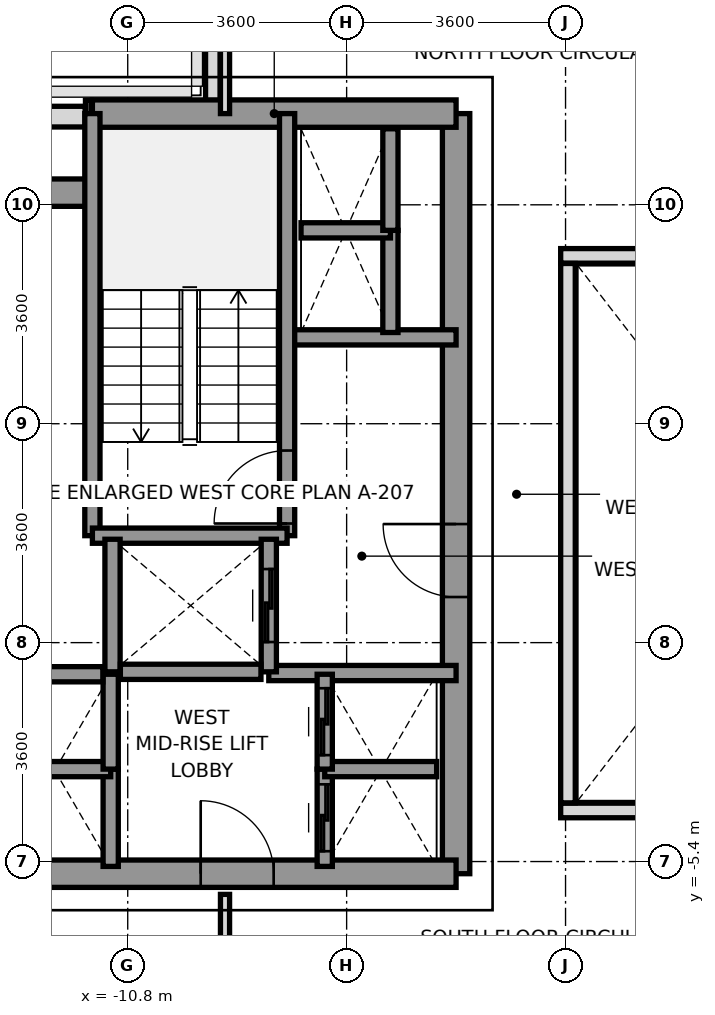
"""IFC4 building model, lengths in metres.
Left out: names, types, materials, properties, quantities, classifications, styles, units other than length and angle.
Written with IfcOpenShell. Run it as: python <this file> out.ifc"""

import sys

from ifc_helpers import new_model, si_unit, direction, frame, frame_2d, origin, place, context, subcontext, project, spatial, rectangle, extrude, source, transform, mapped, element, fill, save


model = new_model("IFC4")
c1 = context("Model", 3, precision=1e-05, world=origin(), true_north=direction((0.0, 1.0)))
c2 = subcontext(c1, "Body", "Model", "MODEL_VIEW")
j1 = project(units=[si_unit("LENGTHUNIT", "METRE"), si_unit("PLANEANGLEUNIT", "RADIAN")], contexts=[c1])
p1 = place(None, origin())
s1 = spatial("IfcSite", under=j1, at=p1, CompositionType="ELEMENT")
p2 = place(p1, origin())
s2 = spatial("IfcBuilding", under=s1, at=p2, CompositionType="ELEMENT")
p3 = place(p2, frame((0.0, 0.0, 97.2)))
s3 = spatial("IfcBuildingStorey", under=s2, at=p3, CompositionType="ELEMENT", Elevation=97.2)
p4 = place(p3, frame((-14.083, 6.85, 0.0), z_axis=(0.0, 0.0, 1.0), x_axis=(1.0, 0.0, 0.0)))
e1 = element("IfcWall", 1, at=p4, inside=s3, PredefinedType="SOLIDWALL", context=c2, shape_type="SweptSolid", body=[
    extrude(rectangle(XDim=2.585, YDim=0.34, at=frame_2d((1.292, 0.0))), origin(), (0.0, 0.0, 1.0), 3.2),
])
p5 = place(p3, frame((-11.495, 7.0, 0.0), z_axis=(0.0, 0.0, 1.0), x_axis=(1.0, 0.0, 0.0)))
e2 = element("IfcWall", 2, at=p5, inside=s3, PredefinedType="PARAPET", context=c2, shape_type="SweptSolid", body=[
    extrude(rectangle(XDim=0.092, YDim=0.24, at=frame_2d((0.046, 0.0))), origin(), (0.0, 0.0, 1.0), 1.15),
])
p6 = place(p3, frame((-9.4, 6.953, 0.0), z_axis=(0.0, 0.0, 1.0), x_axis=(0.0, 1.0, 0.0)))
e3 = element("IfcWall", 3, at=p6, inside=s3, PredefinedType="PARAPET", context=c2, shape_type="SweptSolid", body=[
    extrude(rectangle(XDim=1.519, YDim=0.24, at=frame_2d((0.76, 0.0))), origin(), (0.0, 0.0, 1.0), 1.15),
])
p7 = place(p3, frame((-5.4, -5.6, 0.0), z_axis=(0.0, 0.0, 1.0), x_axis=(0.0, 1.0, 0.0)))
e4 = element("IfcWall", 4, at=p7, inside=s3, PredefinedType="SHEAR", context=c2, shape_type="SweptSolid", body=[
    extrude(rectangle(XDim=12.5, YDim=0.45, at=frame_2d((6.25, 0.0))), origin(), (0.0, 0.0, 1.0), 3.2),
])
p8 = place(p7, frame((4.55, 0.0, 0.0)))
e5 = element("IfcOpeningElement", 5, at=p8, cuts=e4, PredefinedType="OPENING", context=c2, shape_type="SweptSolid", body=[
    extrude(rectangle(XDim=1.2, YDim=2.2, at=frame_2d((0.6, 1.1))), frame((0.0, 0.235, 0.0), z_axis=(0.0, -1.0, 0.0), x_axis=(1.0, 0.0, 0.0)), (0.0, 0.0, 1.0), 0.47),
])
p9 = place(p3, frame((-11.381, 6.9, 0.0), z_axis=(0.0, 0.0, 1.0), x_axis=(1.0, 0.0, 0.0)))
e6 = element("IfcWall", 6, at=p9, inside=s3, PredefinedType="SHEAR", context=c2, shape_type="SweptSolid", body=[
    extrude(rectangle(XDim=5.981, YDim=0.45, at=frame_2d((2.991, 0.0))), origin(), (0.0, 0.0, 1.0), 3.2),
])
p10 = place(p3, frame((-13.2, 5.6, 0.0), z_axis=(0.0, 0.0, 1.0), x_axis=(1.0, 0.0, 0.0)))
e7 = element("IfcWall", 7, at=p10, inside=s3, PredefinedType="SHEAR", context=c2, shape_type="SweptSolid", body=[
    extrude(rectangle(XDim=1.819, YDim=0.45, at=frame_2d((0.909, 0.0))), origin(), (0.0, 0.0, 1.0), 3.2),
])
p11 = place(p3, frame((-13.2, -5.6, 0.0), z_axis=(0.0, 0.0, 1.0), x_axis=(1.0, 0.0, 0.0)))
e8 = element("IfcWall", 8, at=p11, inside=s3, PredefinedType="SHEAR", context=c2, shape_type="SweptSolid", body=[
    extrude(rectangle(XDim=7.8, YDim=0.45, at=frame_2d((3.9, 0.0))), origin(), (0.0, 0.0, 1.0), 3.2),
])
p12 = place(p11, frame((3.6, 0.0, 0.0)))
e9 = element("IfcOpeningElement", 9, at=p12, cuts=e8, PredefinedType="OPENING", context=c2, shape_type="SweptSolid", body=[
    extrude(rectangle(XDim=1.2, YDim=2.2, at=frame_2d((0.6, 1.1))), frame((0.0, 0.235, 0.0), z_axis=(0.0, -1.0, 0.0), x_axis=(1.0, 0.0, 0.0)), (0.0, 0.0, 1.0), 0.47),
])
p13 = place(p3, frame((-8.18, 3.22, 0.0), z_axis=(0.0, 0.0, 1.0), x_axis=(1.0, 0.0, 0.0)))
e10 = element("IfcWall", 10, at=p13, inside=s3, PredefinedType="SOLIDWALL", context=c2, shape_type="SweptSolid", body=[
    extrude(rectangle(XDim=2.78, YDim=0.25, at=frame_2d((1.39, 0.0))), origin(), (0.0, 0.0, 1.0), 3.2),
])
p14 = place(p3, frame((-8.48, -2.3, 0.0), z_axis=(0.0, 0.0, 1.0), x_axis=(1.0, 0.0, 0.0)))
e11 = element("IfcWall", 11, at=p14, inside=s3, PredefinedType="SOLIDWALL", context=c2, shape_type="SweptSolid", body=[
    extrude(rectangle(XDim=3.08, YDim=0.25, at=frame_2d((1.54, 0.0))), origin(), (0.0, 0.0, 1.0), 3.2),
])
p15 = place(p3, frame((-8.179, -0.041, 0.0), z_axis=(0.0, 0.0, 1.0), x_axis=(0.0, 1.0, 0.0)))
e12 = element("IfcWall", 12, at=p15, inside=s3, PredefinedType="SOLIDWALL", context=c2, shape_type="SweptSolid", body=[
    extrude(rectangle(XDim=6.941, YDim=0.25, at=frame_2d((3.47, 0.0))), origin(), (0.0, 0.0, 1.0), 3.2),
])
p16 = place(p15, frame((0.2, 0.0, 0.0)))
e13 = element("IfcOpeningElement", 13, at=p16, cuts=e12, PredefinedType="OPENING", context=c2, shape_type="SweptSolid", body=[
    extrude(rectangle(XDim=1.2, YDim=2.2, at=frame_2d((0.6, 1.1))), frame((0.0, 0.135, 0.0), z_axis=(0.0, -1.0, 0.0), x_axis=(1.0, 0.0, 0.0)), (0.0, 0.0, 1.0), 0.27),
])
p17 = place(p3, frame((-11.381, -0.041, 0.0), z_axis=(0.0, 0.0, 1.0), x_axis=(0.0, 1.0, 0.0)))
e14 = element("IfcWall", 14, at=p17, inside=s3, PredefinedType="SOLIDWALL", context=c2, shape_type="SweptSolid", body=[
    extrude(rectangle(XDim=6.941, YDim=0.25, at=frame_2d((3.47, 0.0))), origin(), (0.0, 0.0, 1.0), 3.2),
])
p18 = place(p3, frame((-11.381, -0.041, 0.0), z_axis=(0.0, 0.0, 1.0), x_axis=(1.0, 0.0, 0.0)))
e15 = element("IfcWall", 15, at=p18, inside=s3, PredefinedType="SOLIDWALL", context=c2, shape_type="SweptSolid", body=[
    extrude(rectangle(XDim=3.202, YDim=0.25, at=frame_2d((1.601, 0.0))), origin(), (0.0, 0.0, 1.0), 3.2),
])
p19 = place(p3, frame((-11.05, -2.28, 0.0), z_axis=(0.0, 0.0, 1.0), x_axis=(0.0, 1.0, 0.0)))
e16 = element("IfcWall", 16, at=p19, inside=s3, PredefinedType="SOLIDWALL", context=c2, shape_type="SweptSolid", body=[
    extrude(rectangle(XDim=2.18, YDim=0.25, at=frame_2d((1.09, 0.0))), origin(), (0.0, 0.0, 1.0), 3.2),
])
p20 = place(p3, frame((-8.48, -2.28, 0.0), z_axis=(0.0, 0.0, 1.0), x_axis=(0.0, 1.0, 0.0)))
e17 = element("IfcWall", 17, at=p20, inside=s3, PredefinedType="SOLIDWALL", context=c2, shape_type="SweptSolid", body=[
    extrude(rectangle(XDim=2.18, YDim=0.25, at=frame_2d((1.09, 0.0))), origin(), (0.0, 0.0, 1.0), 3.2),
])
p21 = place(p20, frame((0.49, 0.0, 0.0)))
e18 = element("IfcOpeningElement", 18, at=p21, cuts=e17, PredefinedType="OPENING", context=c2, shape_type="SweptSolid", body=[
    extrude(rectangle(XDim=1.2, YDim=2.2, at=frame_2d((0.6, 1.1))), frame((0.0, 0.135, 0.0), z_axis=(0.0, -1.0, 0.0), x_axis=(1.0, 0.0, 0.0)), (0.0, 0.0, 1.0), 0.27),
])
p22 = place(p3, frame((-10.921, -2.28, 0.0), z_axis=(0.0, 0.0, 1.0), x_axis=(1.0, 0.0, 0.0)))
e19 = element("IfcWall", 19, at=p22, inside=s3, PredefinedType="SOLIDWALL", context=c2, shape_type="SweptSolid", body=[
    extrude(rectangle(XDim=2.312, YDim=0.25, at=frame_2d((1.156, 0.0))), origin(), (0.0, 0.0, 1.0), 3.2),
])
p23 = place(p3, frame((-11.08, -5.48, 0.0), z_axis=(0.0, 0.0, 1.0), x_axis=(0.0, 1.0, 0.0)))
e20 = element("IfcWall", 20, at=p23, inside=s3, PredefinedType="SOLIDWALL", context=c2, shape_type="SweptSolid", body=[
    extrude(rectangle(XDim=1.6, YDim=0.25, at=frame_2d((0.8, 0.0))), origin(), (0.0, 0.0, 1.0), 3.2),
])
p24 = place(p3, frame((-12.92, -3.88, 0.0), z_axis=(0.0, 0.0, 1.0), x_axis=(1.0, 0.0, 0.0)))
e21 = element("IfcWall", 21, at=p24, inside=s3, PredefinedType="SOLIDWALL", context=c2, shape_type="SweptSolid", body=[
    extrude(rectangle(XDim=1.84, YDim=0.25, at=frame_2d((0.92, 0.0))), origin(), (0.0, 0.0, 1.0), 3.2),
])
p25 = place(p3, frame((-11.08, -3.88, 0.0), z_axis=(0.0, 0.0, 1.0), x_axis=(0.0, 1.0, 0.0)))
e22 = element("IfcWall", 22, at=p25, inside=s3, PredefinedType="SOLIDWALL", context=c2, shape_type="SweptSolid", body=[
    extrude(rectangle(XDim=1.56, YDim=0.25, at=frame_2d((0.78, 0.0))), origin(), (0.0, 0.0, 1.0), 3.2),
])
p26 = place(p3, frame((-12.791, -2.32, 0.0), z_axis=(0.0, 0.0, 1.0), x_axis=(1.0, 0.0, 0.0)))
e23 = element("IfcWall", 23, at=p26, inside=s3, PredefinedType="SOLIDWALL", context=c2, shape_type="SweptSolid", body=[
    extrude(rectangle(XDim=1.582, YDim=0.25, at=frame_2d((0.791, 0.0))), origin(), (0.0, 0.0, 1.0), 3.2),
])
p27 = place(p3, frame((-7.56, -5.48, 0.0), z_axis=(0.0, 0.0, 1.0), x_axis=(0.0, 1.0, 0.0)))
e24 = element("IfcWall", 24, at=p27, inside=s3, PredefinedType="SOLIDWALL", context=c2, shape_type="SweptSolid", body=[
    extrude(rectangle(XDim=1.6, YDim=0.25, at=frame_2d((0.8, 0.0))), origin(), (0.0, 0.0, 1.0), 3.2),
])
p28 = place(p27, frame((0.25, 0.0, 0.0)))
e25 = element("IfcOpeningElement", 25, at=p28, cuts=e24, PredefinedType="OPENING", context=c2, shape_type="SweptSolid", body=[
    extrude(rectangle(XDim=1.1, YDim=2.2, at=frame_2d((0.55, 1.1))), frame((0.0, 0.135, 0.0), z_axis=(0.0, -1.0, 0.0), x_axis=(1.0, 0.0, 0.0)), (0.0, 0.0, 1.0), 0.27),
])
p29 = place(p3, frame((-7.56, -3.88, 0.0), z_axis=(0.0, 0.0, 1.0), x_axis=(1.0, 0.0, 0.0)))
e26 = element("IfcWall", 26, at=p29, inside=s3, PredefinedType="SOLIDWALL", context=c2, shape_type="SweptSolid", body=[
    extrude(rectangle(XDim=1.84, YDim=0.25, at=frame_2d((0.92, 0.0))), origin(), (0.0, 0.0, 1.0), 3.2),
])
p30 = place(p3, frame((-7.56, -3.88, 0.0), z_axis=(0.0, 0.0, 1.0), x_axis=(0.0, 1.0, 0.0)))
e27 = element("IfcWall", 27, at=p30, inside=s3, PredefinedType="SOLIDWALL", context=c2, shape_type="SweptSolid", body=[
    extrude(rectangle(XDim=1.56, YDim=0.25, at=frame_2d((0.78, 0.0))), origin(), (0.0, 0.0, 1.0), 3.2),
])
p31 = place(p30, frame((0.23, 0.0, 0.0)))
e28 = element("IfcOpeningElement", 28, at=p31, cuts=e27, PredefinedType="OPENING", context=c2, shape_type="SweptSolid", body=[
    extrude(rectangle(XDim=1.1, YDim=2.2, at=frame_2d((0.55, 1.1))), frame((0.0, 0.135, 0.0), z_axis=(0.0, -1.0, 0.0), x_axis=(1.0, 0.0, 0.0)), (0.0, 0.0, 1.0), 0.27),
])
p32 = place(p3, frame((-6.48, 3.3, 0.0), z_axis=(0.0, 0.0, 1.0), x_axis=(0.0, 1.0, 0.0)))
e29 = element("IfcWall", 29, at=p32, inside=s3, PredefinedType="SOLIDWALL", context=c2, shape_type="SweptSolid", body=[
    extrude(rectangle(XDim=1.68, YDim=0.25, at=frame_2d((0.84, 0.0))), origin(), (0.0, 0.0, 1.0), 3.2),
])
p33 = place(p3, frame((-7.95, 4.98, 0.0), z_axis=(0.0, 0.0, 1.0), x_axis=(1.0, 0.0, 0.0)))
e30 = element("IfcWall", 30, at=p33, inside=s3, PredefinedType="SOLIDWALL", context=c2, shape_type="SweptSolid", body=[
    extrude(rectangle(XDim=1.47, YDim=0.25, at=frame_2d((0.735, 0.0))), origin(), (0.0, 0.0, 1.0), 3.2),
])
p34 = place(p3, frame((-6.48, 4.98, 0.0), z_axis=(0.0, 0.0, 1.0), x_axis=(0.0, 1.0, 0.0)))
e31 = element("IfcWall", 31, at=p34, inside=s3, PredefinedType="SOLIDWALL", context=c2, shape_type="SweptSolid", body=[
    extrude(rectangle(XDim=1.67, YDim=0.25, at=frame_2d((0.835, 0.0))), origin(), (0.0, 0.0, 1.0), 3.2),
])
p35 = place(p3, frame((-9.2, 6.9, 0.0), z_axis=(0.0, 0.0, 1.0), x_axis=(0.0, 1.0, 0.0)))
e32 = element("IfcWall", 32, at=p35, inside=s3, PredefinedType="PARTITIONING", context=c2, shape_type="SweptSolid", body=[
    extrude(rectangle(XDim=8.78, YDim=0.15, at=frame_2d((4.39, 0.0))), origin(), (0.0, 0.0, 1.0), 2.7),
])
p36 = place(p3, frame((-9.2, -15.68, 0.0), z_axis=(0.0, 0.0, 1.0), x_axis=(0.0, 1.0, 0.0)))
e33 = element("IfcWall", 33, at=p36, inside=s3, PredefinedType="PARTITIONING", context=c2, shape_type="SweptSolid", body=[
    extrude(rectangle(XDim=9.74, YDim=0.15, at=frame_2d((4.87, 0.0))), origin(), (0.0, 0.0, 1.0), 2.7),
])
for number, where, z_axis, x_axis in (
    (34, (-3.68, -4.56, 0.0), (0.0, 0.0, 1.0), (1.0, 0.0, 0.0)),
    (35, (-3.68, 4.56, 0.0), (0.0, 0.0, 1.0), (1.0, 0.0, 0.0)),
):
    element("IfcWall", number, at=place(p3, frame(where, z_axis=z_axis, x_axis=x_axis)), inside=s3, PredefinedType="PARAPET", context=c2, shape_type="SweptSolid", body=[
        extrude(rectangle(XDim=7.36, YDim=0.24, at=frame_2d((3.68, 0.0))), origin(), (0.0, 0.0, 1.0), 1.15),
    ])
p37 = place(p3, frame((-3.56, -4.435, 0.0), z_axis=(0.0, 0.0, 1.0), x_axis=(0.0, 1.0, 0.0)))
e36 = element("IfcWall", 36, at=p37, inside=s3, PredefinedType="PARAPET", context=c2, shape_type="SweptSolid", body=[
    extrude(rectangle(XDim=8.87, YDim=0.24, at=frame_2d((4.435, 0.0))), origin(), (0.0, 0.0, 1.0), 1.15),
])
m1 = source(origin(), c2, "Body", "SweptSolid", [
    extrude(rectangle(XDim=1.2, YDim=2.2, at=frame_2d((0.6, 1.1))), frame((0.0, 0.025, 0.0), z_axis=(0.0, -1.0, 0.0), x_axis=(1.0, 0.0, 0.0)), (0.0, 0.0, 1.0), 0.05),
])
p38 = place(p16, origin())
e37 = element("IfcDoor", 37, at=p38, inside=s3, OperationType="SINGLE_SWING_LEFT", PredefinedType="DOOR", context=c2, shape_type="MappedRepresentation", body=[
    mapped(m1, transform((0.0, 0.0, 0.0), x_axis=(1.0, 0.0, 0.0), y_axis=(0.0, 1.0, 0.0), z_axis=(0.0, 0.0, 1.0), scale=1.0)),
])
fill(e13, e37)
p39 = place(p8, origin())
e38 = element("IfcDoor", 38, at=p39, inside=s3, OperationType="SINGLE_SWING_RIGHT", PredefinedType="DOOR", context=c2, shape_type="MappedRepresentation", body=[
    mapped(m1, transform((0.0, 0.0, 0.0), x_axis=(1.0, 0.0, 0.0), y_axis=(0.0, 1.0, 0.0), z_axis=(0.0, 0.0, 1.0), scale=1.0)),
])
fill(e5, e38)
p40 = place(p12, origin())
e39 = element("IfcDoor", 39, at=p40, inside=s3, OperationType="SINGLE_SWING_LEFT", PredefinedType="DOOR", context=c2, shape_type="MappedRepresentation", body=[
    mapped(m1, transform((0.0, 0.0, 0.0), x_axis=(1.0, 0.0, 0.0), y_axis=(0.0, 1.0, 0.0), z_axis=(0.0, 0.0, 1.0), scale=1.0)),
])
fill(e9, e39)
p41 = place(p21, origin())
e40 = element("IfcDoor", 40, at=p41, inside=s3, OperationType="SLIDING_TO_RIGHT", PredefinedType="DOOR", context=c2, shape_type="MappedRepresentation", body=[
    mapped(m1, transform((0.0, 0.0, 0.0), x_axis=(1.0, 0.0, 0.0), y_axis=(0.0, 1.0, 0.0), z_axis=(0.0, 0.0, 1.0), scale=1.0)),
])
fill(e18, e40)
m2 = source(origin(), c2, "Body", "SweptSolid", [
    extrude(rectangle(XDim=1.1, YDim=2.2, at=frame_2d((0.55, 1.1))), frame((0.0, 0.025, 0.0), z_axis=(0.0, -1.0, 0.0), x_axis=(1.0, 0.0, 0.0)), (0.0, 0.0, 1.0), 0.05),
])
p42 = place(p28, origin())
e41 = element("IfcDoor", 41, at=p42, inside=s3, OperationType="SLIDING_TO_LEFT", PredefinedType="DOOR", context=c2, shape_type="MappedRepresentation", body=[
    mapped(m2, transform((0.0, 0.0, 0.0), x_axis=(1.0, 0.0, 0.0), y_axis=(0.0, 1.0, 0.0), z_axis=(0.0, 0.0, 1.0), scale=1.0)),
])
fill(e25, e41)
p43 = place(p31, origin())
e42 = element("IfcDoor", 42, at=p43, inside=s3, OperationType="SLIDING_TO_LEFT", PredefinedType="DOOR", context=c2, shape_type="MappedRepresentation", body=[
    mapped(m2, transform((0.0, 0.0, 0.0), x_axis=(1.0, 0.0, 0.0), y_axis=(0.0, 1.0, 0.0), z_axis=(0.0, 0.0, 1.0), scale=1.0)),
])
fill(e28, e42)
save(model, sys.argv[1])
